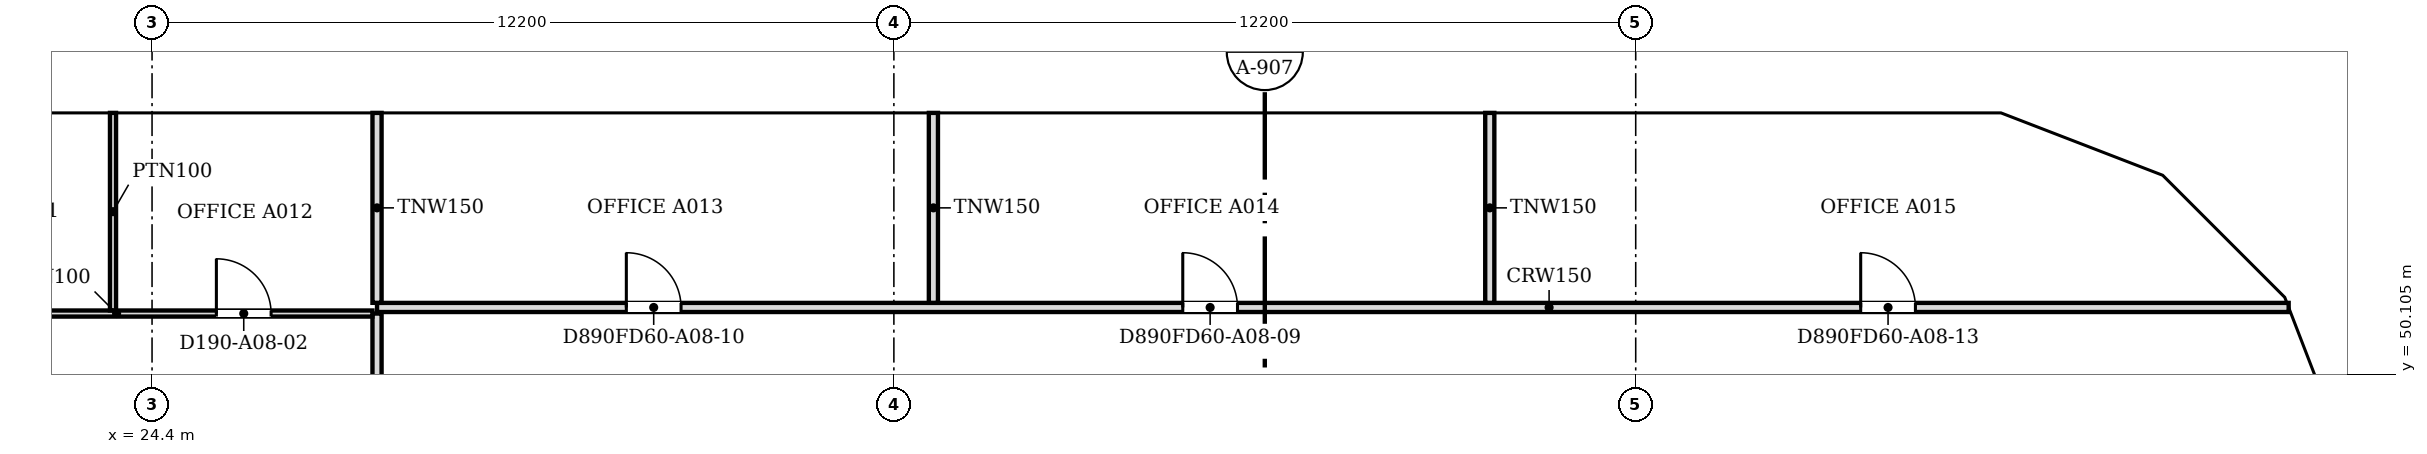
"""IFC4 building model, lengths in metres.
Left out: names, types, materials, properties, quantities, classifications, styles, units other than length and angle.
Written with IfcOpenShell. Run it as: python <this file> out.ifc"""

import sys

from ifc_helpers import new_model, si_unit, direction, frame, frame_2d, origin, place, context, subcontext, project, spatial, polyline, rectangle, outline, extrude, faceted_brep, source, transform, mapped, element, fill, save


model = new_model("IFC4")
c1 = context("Model", 3, precision=1e-05, world=origin(), true_north=direction((0.0, 1.0)))
c2 = subcontext(c1, "Body", "Model", "MODEL_VIEW")
j1 = project(units=[si_unit("LENGTHUNIT", "METRE"), si_unit("PLANEANGLEUNIT", "RADIAN")], contexts=[c1])
p1 = place(None, origin())
s1 = spatial("IfcSite", under=j1, at=p1, CompositionType="ELEMENT")
p2 = place(p1, origin())
s2 = spatial("IfcBuilding", under=s1, at=p2, CompositionType="ELEMENT")
p3 = place(p2, frame((0.0, 0.0, 95.2)))
s3 = spatial("IfcBuildingStorey", under=s2, at=p3, CompositionType="ELEMENT", Elevation=95.2)
m1 = source(origin(), c2, "Body", "Brep", [
    faceted_brep([(0.047, -0.25, 0.0), (2.997, -0.25, 3.8), (0.047, -0.25, 7.6), (0.0, -0.25, 7.541), (0.0, -0.25, 0.059), (0.093, 0.25, 7.54), (2.944, 0.25, 3.868), (2.944, 0.25, 3.732), (0.093, 0.25, 0.06), (2.997, 0.0, 3.8), (0.047, 0.0, 0.0), (0.047, 0.0, 7.6)], [[[0, 1, 2, 3, 4]], [[5, 6, 7, 8]], [[8, 7, 9, 1, 0, 10]], [[6, 5, 11, 2, 1, 9]], [[3, 2, 11]], [[10, 0, 4]], [[8, 10, 4, 3, 11, 5]], [[9, 7, 6]]]),
])
p4 = place(p3, frame((60.767, 48.71, -3.8), z_axis=(0.0, 0.0, 1.0), x_axis=(-0.359901446078, 0.932990326376, 0.0)))
e1 = element("IfcWall", 1, at=p4, inside=s3, PredefinedType="SOLIDWALL", context=c2, shape_type="MappedRepresentation", body=[
    mapped(m1, transform((0.0, 0.0, 0.0), scale=1.0)),
])
m2 = source(origin(), c2, "Body", "SweptSolid", [
    extrude(outline(polyline([(0.247, 0.665), (2.681, 3.8), (0.247, 6.935), (0.247, 0.665)])), frame((0.0, 0.26, 0.0), z_axis=(0.0, -1.0, 0.0), x_axis=(1.0, 0.0, 0.0)), (0.0, 0.0, 1.0), 0.52),
])
p5 = place(p4, origin())
e2 = element("IfcOpeningElement", 2, at=p5, cuts=e1, PredefinedType="OPENING", context=c2, shape_type="MappedRepresentation", body=[
    mapped(m2, transform((0.0, 0.0, 0.0), scale=1.0)),
])
m3 = source(origin(), c2, "Body", "Brep", [
    faceted_brep([(2.944, -0.25, 0.0), (2.997, -0.25, 0.068), (2.997, -0.25, 7.532), (2.944, -0.25, 7.6), (0.0, -0.25, 3.8), (0.053, 0.25, 3.868), (2.891, 0.25, 7.532), (2.891, 0.25, 0.068), (0.053, 0.25, 3.732), (2.944, 0.0, 0.0), (2.944, 0.0, 7.6), (0.0, 0.0, 3.8)], [[[0, 1, 2, 3, 4]], [[5, 6, 7, 8]], [[1, 0, 9]], [[10, 3, 2]], [[6, 5, 11, 4, 3, 10]], [[8, 7, 9, 0, 4, 11]], [[8, 11, 5]], [[1, 9, 7, 6, 10, 2]]]),
])
p6 = place(p3, frame((59.688, 51.506, -3.8), z_axis=(0.0, 0.0, 1.0), x_axis=(-0.707106781187, 0.707106781187, 0.0)))
e3 = element("IfcWall", 3, at=p6, inside=s3, PredefinedType="SOLIDWALL", context=c2, shape_type="MappedRepresentation", body=[
    mapped(m3, transform((0.0, 0.0, 0.0), scale=1.0)),
])
m4 = source(origin(), c2, "Body", "SweptSolid", [
    extrude(outline(polyline([(2.744, 6.934), (0.316, 3.8), (2.744, 0.667), (2.744, 6.934)])), frame((0.0, 0.26, 0.0), z_axis=(0.0, -1.0, 0.0), x_axis=(1.0, 0.0, 0.0)), (0.0, 0.0, 1.0), 0.52),
])
p7 = place(p6, origin())
e4 = element("IfcOpeningElement", 4, at=p7, cuts=e3, PredefinedType="OPENING", context=c2, shape_type="MappedRepresentation", body=[
    mapped(m4, transform((0.0, 0.0, 0.0), scale=1.0)),
])
m5 = source(origin(), c2, "Body", "Brep", [
    faceted_brep([(0.053, -0.25, 0.0), (3.003, -0.25, 3.8), (0.053, -0.25, 7.6), (0.0, -0.25, 7.532), (0.0, -0.25, 0.068), (0.106, 0.25, 7.532), (2.957, 0.25, 3.86), (2.957, 0.25, 3.74), (0.106, 0.25, 0.068), (3.003, 0.0, 3.8), (0.053, 0.0, 0.0), (0.053, 0.0, 7.6)], [[[0, 1, 2, 3, 4]], [[5, 6, 7, 8]], [[8, 7, 9, 1, 0, 10]], [[6, 5, 11, 2, 1, 9]], [[3, 2, 11]], [[10, 0, 4]], [[8, 10, 4, 3, 11, 5]], [[9, 7, 6]]]),
])
p8 = place(p3, frame((57.656, 53.569, -3.8), z_axis=(0.0, 0.0, 1.0), x_axis=(-0.933007896601, 0.359855894603, 0.0)))
e5 = element("IfcWall", 5, at=p8, inside=s3, PredefinedType="SOLIDWALL", context=c2, shape_type="MappedRepresentation", body=[
    mapped(m5, transform((0.0, 0.0, 0.0), scale=1.0)),
])
m6 = source(origin(), c2, "Body", "SweptSolid", [
    extrude(outline(polyline([(0.253, 0.665), (2.687, 3.8), (0.253, 6.935), (0.253, 0.665)])), frame((0.0, 0.26, 0.0), z_axis=(0.0, -1.0, 0.0), x_axis=(1.0, 0.0, 0.0)), (0.0, 0.0, 1.0), 0.52),
])
p9 = place(p8, origin())
e6 = element("IfcOpeningElement", 6, at=p9, cuts=e5, PredefinedType="OPENING", context=c2, shape_type="MappedRepresentation", body=[
    mapped(m6, transform((0.0, 0.0, 0.0), scale=1.0)),
])
m7 = source(origin(), c2, "Body", "Brep", [
    faceted_brep([(3.003, -0.25, 0.0), (6.053, -0.25, 3.8), (3.003, -0.25, 7.6), (0.0, -0.25, 3.8), (0.047, 0.25, 3.859), (3.003, 0.25, 7.6), (6.053, 0.25, 3.8), (3.003, 0.25, 0.0), (0.047, 0.25, 3.741), (0.0, 0.0, 3.8)], [[[0, 1, 2, 3]], [[4, 5, 6, 7, 8]], [[7, 6, 1, 0]], [[6, 5, 2, 1]], [[5, 4, 9, 3, 2]], [[8, 7, 0, 3, 9]], [[8, 9, 4]]]),
])
p10 = place(p3, frame((54.854, 54.65, -3.8), z_axis=(0.0, 0.0, 1.0), x_axis=(-1.0, 0.0, 0.0)))
e7 = element("IfcWall", 7, at=p10, inside=s3, PredefinedType="SOLIDWALL", context=c2, shape_type="MappedRepresentation", body=[
    mapped(m7, transform((0.0, 0.0, 0.0), scale=1.0)),
])
m8 = source(origin(), c2, "Body", "SweptSolid", [
    extrude(outline(polyline([(3.005, 0.401), (5.733, 3.8), (3.005, 7.199), (0.319, 3.8), (3.005, 0.401)])), frame((0.0, 0.26, 0.0), z_axis=(0.0, -1.0, 0.0), x_axis=(1.0, 0.0, 0.0)), (0.0, 0.0, 1.0), 0.52),
])
p11 = place(p10, origin())
e8 = element("IfcOpeningElement", 8, at=p11, cuts=e7, PredefinedType="OPENING", context=c2, shape_type="MappedRepresentation", body=[
    mapped(m8, transform((0.0, 0.0, 0.0), scale=1.0)),
])
m9 = source(origin(), c2, "Body", "SweptSolid", [
    extrude(outline(polyline([(3.05, 0.0), (6.1, 3.8), (3.05, 7.6), (0.0, 3.8), (3.05, 0.0)])), frame((0.0, 0.25, 0.0), z_axis=(0.0, -1.0, 0.0), x_axis=(1.0, 0.0, 0.0)), (0.0, 0.0, 1.0), 0.5),
])
p12 = place(p3, frame((48.8, 54.65, -3.8), z_axis=(0.0, 0.0, 1.0), x_axis=(-1.0, 0.0, 0.0)))
e9 = element("IfcWall", 9, at=p12, inside=s3, PredefinedType="SOLIDWALL", context=c2, shape_type="MappedRepresentation", body=[
    mapped(m9, transform((0.0, 0.0, 0.0), scale=1.0)),
])
m10 = source(origin(), c2, "Body", "SweptSolid", [
    extrude(outline(polyline([(3.05, 0.399), (5.78, 3.8), (3.05, 7.201), (0.321, 3.8), (3.05, 0.399)])), frame((0.0, 0.26, 0.0), z_axis=(0.0, -1.0, 0.0), x_axis=(1.0, 0.0, 0.0)), (0.0, 0.0, 1.0), 0.52),
])
p13 = place(p12, origin())
e10 = element("IfcOpeningElement", 10, at=p13, cuts=e9, PredefinedType="OPENING", context=c2, shape_type="MappedRepresentation", body=[
    mapped(m10, transform((0.0, 0.0, 0.0), scale=1.0)),
])
m11 = source(origin(), c2, "Body", "Brep", [
    faceted_brep([(3.05, -0.25, 0.0), (6.1, -0.25, 3.8), (6.1, -0.25, 3.8), (3.05, -0.25, 7.6), (0.0, -0.25, 3.8), (0.0, 0.25, 3.8), (3.05, 0.25, 7.6), (6.1, 0.25, 3.8), (6.1, 0.25, 3.8), (3.05, 0.25, 0.0)], [[[0, 1, 2, 3, 4]], [[5, 6, 7, 8, 9]], [[9, 8, 1, 0]], [[7, 6, 3, 2]], [[6, 5, 4, 3]], [[5, 9, 0, 4]], [[1, 8, 7, 2]]]),
])
p14 = place(p3, frame((42.7, 54.65, -3.8), z_axis=(0.0, 0.0, 1.0), x_axis=(-1.0, 0.0, 0.0)))
e11 = element("IfcWall", 11, at=p14, inside=s3, PredefinedType="SOLIDWALL", context=c2, shape_type="MappedRepresentation", body=[
    mapped(m11, transform((0.0, 0.0, 0.0), scale=1.0)),
])
p15 = place(p14, origin())
e12 = element("IfcOpeningElement", 12, at=p15, cuts=e11, PredefinedType="OPENING", context=c2, shape_type="MappedRepresentation", body=[
    mapped(m10, transform((0.0, 0.0, 0.0), scale=1.0)),
])
p16 = place(p3, frame((36.6, 54.65, -3.8), z_axis=(0.0, 0.0, 1.0), x_axis=(-1.0, 0.0, 0.0)))
e13 = element("IfcWall", 13, at=p16, inside=s3, PredefinedType="SOLIDWALL", context=c2, shape_type="MappedRepresentation", body=[
    mapped(m9, transform((0.0, 0.0, 0.0), scale=1.0)),
])
p17 = place(p16, origin())
e14 = element("IfcOpeningElement", 14, at=p17, cuts=e13, PredefinedType="OPENING", context=c2, shape_type="MappedRepresentation", body=[
    mapped(m10, transform((0.0, 0.0, 0.0), scale=1.0)),
])
p18 = place(p3, frame((30.5, 54.65, -3.8), z_axis=(0.0, 0.0, 1.0), x_axis=(-1.0, 0.0, 0.0)))
e15 = element("IfcWall", 15, at=p18, inside=s3, PredefinedType="SOLIDWALL", context=c2, shape_type="MappedRepresentation", body=[
    mapped(m9, transform((0.0, 0.0, 0.0), scale=1.0)),
])
p19 = place(p18, origin())
e16 = element("IfcOpeningElement", 16, at=p19, cuts=e15, PredefinedType="OPENING", context=c2, shape_type="MappedRepresentation", body=[
    mapped(m10, transform((0.0, 0.0, 0.0), scale=1.0)),
])
p20 = place(p3, frame((24.4, 54.65, -3.8), z_axis=(0.0, 0.0, 1.0), x_axis=(-1.0, 0.0, 0.0)))
e17 = element("IfcWall", 17, at=p20, inside=s3, PredefinedType="SOLIDWALL", context=c2, shape_type="MappedRepresentation", body=[
    mapped(m11, transform((0.0, 0.0, 0.0), scale=1.0)),
])
p21 = place(p20, origin())
e18 = element("IfcOpeningElement", 18, at=p21, cuts=e17, PredefinedType="OPENING", context=c2, shape_type="MappedRepresentation", body=[
    mapped(m10, transform((0.0, 0.0, 0.0), scale=1.0)),
])
p22 = place(p2, frame((0.0, 0.0, 99.0)))
s4 = spatial("IfcBuildingStorey", under=s2, at=p22, CompositionType="ELEMENT", Elevation=99.0)
m12 = source(origin(), c2, "Body", "Brep", [
    faceted_brep([(2.95, -0.25, 0.0), (3.003, -0.25, 0.068), (3.003, -0.25, 7.532), (2.95, -0.25, 7.6), (0.0, -0.25, 3.8), (0.047, 0.25, 3.86), (2.898, 0.25, 7.532), (2.898, 0.25, 0.068), (0.047, 0.25, 3.74), (2.95, 0.0, 0.0), (2.95, 0.0, 7.6), (0.0, 0.0, 3.8)], [[[0, 1, 2, 3, 4]], [[5, 6, 7, 8]], [[1, 0, 9]], [[10, 3, 2]], [[6, 5, 11, 4, 3, 10]], [[8, 7, 9, 0, 4, 11]], [[8, 11, 5]], [[1, 9, 7, 6, 10, 2]]]),
])
p23 = place(p22, frame((60.75, 48.753, -3.8), z_axis=(0.0, 0.0, 1.0), x_axis=(-0.35992665181, 0.932980602862, 0.0)))
e19 = element("IfcWall", 19, at=p23, inside=s4, PredefinedType="SOLIDWALL", context=c2, shape_type="MappedRepresentation", body=[
    mapped(m12, transform((0.0, 0.0, 0.0), scale=1.0)),
])
m13 = source(origin(), c2, "Body", "SweptSolid", [
    extrude(outline(polyline([(2.75, 6.935), (0.316, 3.8), (2.75, 0.665), (2.75, 6.935)])), frame((0.0, 0.26, 0.0), z_axis=(0.0, -1.0, 0.0), x_axis=(1.0, 0.0, 0.0)), (0.0, 0.0, 1.0), 0.52),
])
p24 = place(p23, origin())
e20 = element("IfcOpeningElement", 20, at=p24, cuts=e19, PredefinedType="OPENING", context=c2, shape_type="MappedRepresentation", body=[
    mapped(m13, transform((0.0, 0.0, 0.0), scale=1.0)),
])
m14 = source(origin(), c2, "Body", "Brep", [
    faceted_brep([(0.053, -0.25, 0.0), (2.997, -0.25, 3.8), (0.053, -0.25, 7.6), (0.0, -0.25, 7.532), (0.0, -0.25, 0.068), (0.106, 0.25, 7.532), (2.944, 0.25, 3.868), (2.944, 0.25, 3.732), (0.106, 0.25, 0.068), (2.997, 0.0, 3.8), (0.053, 0.0, 0.0), (0.053, 0.0, 7.6)], [[[0, 1, 2, 3, 4]], [[5, 6, 7, 8]], [[8, 7, 9, 1, 0, 10]], [[6, 5, 11, 2, 1, 9]], [[3, 2, 11]], [[10, 0, 4]], [[8, 10, 4, 3, 11, 5]], [[9, 7, 6]]]),
])
p25 = place(p22, frame((59.726, 51.469, -3.8), z_axis=(0.0, 0.0, 1.0), x_axis=(-0.707106781187, 0.707106781187, 0.0)))
e21 = element("IfcWall", 21, at=p25, inside=s4, PredefinedType="SOLIDWALL", context=c2, shape_type="MappedRepresentation", body=[
    mapped(m14, transform((0.0, 0.0, 0.0), scale=1.0)),
])
m15 = source(origin(), c2, "Body", "SweptSolid", [
    extrude(outline(polyline([(0.253, 0.666), (2.681, 3.8), (0.253, 6.934), (0.253, 0.666)])), frame((0.0, 0.26, 0.0), z_axis=(0.0, -1.0, 0.0), x_axis=(1.0, 0.0, 0.0)), (0.0, 0.0, 1.0), 0.52),
])
p26 = place(p25, origin())
e22 = element("IfcOpeningElement", 22, at=p26, cuts=e21, PredefinedType="OPENING", context=c2, shape_type="MappedRepresentation", body=[
    mapped(m15, transform((0.0, 0.0, 0.0), scale=1.0)),
])
m16 = source(origin(), c2, "Body", "Brep", [
    faceted_brep([(2.95, -0.25, 0.0), (2.997, -0.25, 0.059), (2.997, -0.25, 7.541), (2.95, -0.25, 7.6), (0.0, -0.25, 3.8), (0.053, 0.25, 3.868), (2.904, 0.25, 7.54), (2.904, 0.25, 0.06), (0.053, 0.25, 3.732), (2.95, 0.0, 0.0), (2.95, 0.0, 7.6), (0.0, 0.0, 3.8)], [[[0, 1, 2, 3, 4]], [[5, 6, 7, 8]], [[1, 0, 9]], [[10, 3, 2]], [[6, 5, 11, 4, 3, 10]], [[8, 7, 9, 0, 4, 11]], [[8, 11, 5]], [[1, 9, 7, 6, 10, 2]]]),
])
p27 = place(p22, frame((57.606, 53.588, -3.8), z_axis=(0.0, 0.0, 1.0), x_axis=(-0.932990326376, 0.359901446078, 0.0)))
e23 = element("IfcWall", 23, at=p27, inside=s4, PredefinedType="SOLIDWALL", context=c2, shape_type="MappedRepresentation", body=[
    mapped(m16, transform((0.0, 0.0, 0.0), scale=1.0)),
])
p28 = place(p27, origin())
e24 = element("IfcOpeningElement", 24, at=p28, cuts=e23, PredefinedType="OPENING", context=c2, shape_type="MappedRepresentation", body=[
    mapped(m13, transform((0.0, 0.0, 0.0), scale=1.0)),
])
m17 = source(origin(), c2, "Body", "Brep", [
    faceted_brep([(0.047, -0.25, 0.0), (3.05, -0.25, 3.8), (0.047, -0.25, 7.6), (0.0, -0.25, 7.54), (0.0, -0.25, 0.06), (0.093, 0.25, 7.541), (3.05, 0.25, 3.8), (0.093, 0.25, 0.059), (0.047, 0.0, 0.0), (0.047, 0.0, 7.6)], [[[0, 1, 2, 3, 4]], [[5, 6, 7]], [[7, 6, 1, 0, 8]], [[6, 5, 9, 2, 1]], [[3, 2, 9]], [[8, 0, 4]], [[7, 8, 4, 3, 9, 5]]]),
])
p29 = place(p22, frame((54.9, 54.65, -3.8), z_axis=(0.0, 0.0, 1.0), x_axis=(-1.0, 0.0, 0.0)))
e25 = element("IfcWall", 25, at=p29, inside=s4, PredefinedType="SOLIDWALL", context=c2, shape_type="MappedRepresentation", body=[
    mapped(m17, transform((0.0, 0.0, 0.0), scale=1.0)),
])
m18 = source(origin(), c2, "Body", "SweptSolid", [
    extrude(outline(polyline([(0.247, 0.656), (2.731, 3.8), (0.247, 6.944), (0.247, 0.656)])), frame((0.0, 0.26, 0.0), z_axis=(0.0, -1.0, 0.0), x_axis=(1.0, 0.0, 0.0)), (0.0, 0.0, 1.0), 0.52),
])
p30 = place(p29, origin())
e26 = element("IfcOpeningElement", 26, at=p30, cuts=e25, PredefinedType="OPENING", context=c2, shape_type="MappedRepresentation", body=[
    mapped(m18, transform((0.0, 0.0, 0.0), scale=1.0)),
])
p31 = place(p22, frame((51.85, 54.65, -3.8), z_axis=(0.0, 0.0, 1.0), x_axis=(-1.0, 0.0, 0.0)))
e27 = element("IfcWall", 27, at=p31, inside=s4, PredefinedType="SOLIDWALL", context=c2, shape_type="MappedRepresentation", body=[
    mapped(m9, transform((0.0, 0.0, 0.0), scale=1.0)),
])
p32 = place(p31, origin())
e28 = element("IfcOpeningElement", 28, at=p32, cuts=e27, PredefinedType="OPENING", context=c2, shape_type="MappedRepresentation", body=[
    mapped(m10, transform((0.0, 0.0, 0.0), scale=1.0)),
])
p33 = place(p22, frame((45.75, 54.65, -3.8), z_axis=(0.0, 0.0, 1.0), x_axis=(-1.0, 0.0, 0.0)))
e29 = element("IfcWall", 29, at=p33, inside=s4, PredefinedType="SOLIDWALL", context=c2, shape_type="MappedRepresentation", body=[
    mapped(m9, transform((0.0, 0.0, 0.0), scale=1.0)),
])
p34 = place(p33, origin())
e30 = element("IfcOpeningElement", 30, at=p34, cuts=e29, PredefinedType="OPENING", context=c2, shape_type="MappedRepresentation", body=[
    mapped(m10, transform((0.0, 0.0, 0.0), scale=1.0)),
])
p35 = place(p22, frame((39.65, 54.65, -3.8), z_axis=(0.0, 0.0, 1.0), x_axis=(-1.0, 0.0, 0.0)))
e31 = element("IfcWall", 31, at=p35, inside=s4, PredefinedType="SOLIDWALL", context=c2, shape_type="MappedRepresentation", body=[
    mapped(m11, transform((0.0, 0.0, 0.0), scale=1.0)),
])
p36 = place(p35, origin())
e32 = element("IfcOpeningElement", 32, at=p36, cuts=e31, PredefinedType="OPENING", context=c2, shape_type="MappedRepresentation", body=[
    mapped(m10, transform((0.0, 0.0, 0.0), scale=1.0)),
])
p37 = place(p22, frame((33.55, 54.65, -3.8), z_axis=(0.0, 0.0, 1.0), x_axis=(-1.0, 0.0, 0.0)))
e33 = element("IfcWall", 33, at=p37, inside=s4, PredefinedType="SOLIDWALL", context=c2, shape_type="MappedRepresentation", body=[
    mapped(m9, transform((0.0, 0.0, 0.0), scale=1.0)),
])
p38 = place(p37, origin())
e34 = element("IfcOpeningElement", 34, at=p38, cuts=e33, PredefinedType="OPENING", context=c2, shape_type="MappedRepresentation", body=[
    mapped(m10, transform((0.0, 0.0, 0.0), scale=1.0)),
])
p39 = place(p22, frame((27.45, 54.65, -3.8), z_axis=(0.0, 0.0, 1.0), x_axis=(-1.0, 0.0, 0.0)))
e35 = element("IfcWall", 35, at=p39, inside=s4, PredefinedType="SOLIDWALL", context=c2, shape_type="MappedRepresentation", body=[
    mapped(m11, transform((0.0, 0.0, 0.0), scale=1.0)),
])
p40 = place(p39, origin())
e36 = element("IfcOpeningElement", 36, at=p40, cuts=e35, PredefinedType="OPENING", context=c2, shape_type="MappedRepresentation", body=[
    mapped(m10, transform((0.0, 0.0, 0.0), scale=1.0)),
])
p41 = place(p3, frame((28.1, 47.776, 0.0), z_axis=(0.0, 0.0, 1.0), x_axis=(0.0, 1.0, 0.0)))
e37 = element("IfcWall", 37, at=p41, inside=s3, PredefinedType="PARTITIONING", context=c2, shape_type="SweptSolid", body=[
    extrude(rectangle(XDim=3.324, YDim=0.15, at=frame_2d((1.662, 0.0))), origin(), (0.0, 0.0, 1.0), 3.067),
])
p42 = place(p3, frame((19.776, 51.1, 0.0), z_axis=(0.0, 0.0, 1.0), x_axis=(1.0, 0.0, 0.0)))
e38 = element("IfcWall", 38, at=p42, inside=s3, PredefinedType="PARTITIONING", context=c2, shape_type="SweptSolid", body=[
    extrude(rectangle(XDim=8.248, YDim=0.1, at=frame_2d((4.124, 0.0))), origin(), (0.0, 0.0, 1.0), 3.067),
])
m19 = source(origin(), c2, "Body", "SweptSolid", [
    extrude(rectangle(XDim=0.9, YDim=2.1, at=frame_2d((0.45, 1.05))), frame((0.0, 0.06, 0.0), z_axis=(0.0, -1.0, 0.0), x_axis=(1.0, 0.0, 0.0)), (0.0, 0.0, 1.0), 0.12),
])
p43 = place(p42, frame((1.5, 0.0, 0.0)))
e39 = element("IfcOpeningElement", 39, at=p43, cuts=e38, PredefinedType="OPENING", context=c2, shape_type="MappedRepresentation", body=[
    mapped(m19, transform((0.0, 0.0, 0.0), scale=1.0)),
])
p44 = place(p42, frame((5.682, 0.0, 0.0)))
e40 = element("IfcOpeningElement", 40, at=p44, cuts=e38, PredefinedType="OPENING", context=c2, shape_type="MappedRepresentation", body=[
    mapped(m19, transform((0.0, 0.0, 0.0), scale=1.0)),
])
p45 = place(p3, frame((23.758, 51.151, 0.0), z_axis=(0.0, 0.0, 1.0), x_axis=(0.0, 1.0, 0.0)))
e41 = element("IfcWall", 41, at=p45, inside=s3, PredefinedType="PARTITIONING", context=c2, shape_type="SweptSolid", body=[
    extrude(rectangle(XDim=3.249, YDim=0.1, at=frame_2d((1.625, 0.0))), origin(), (0.0, 0.0, 1.0), 3.067),
])
p46 = place(p3, frame((28.1, 51.2, 0.0), z_axis=(0.0, 0.0, 1.0), x_axis=(1.0, 0.0, 0.0)))
e42 = element("IfcWall", 42, at=p46, inside=s3, PredefinedType="PARTITIONING", context=c2, shape_type="SweptSolid", body=[
    extrude(rectangle(XDim=31.438, YDim=0.15, at=frame_2d((15.719, 0.0))), origin(), (0.0, 0.0, 1.0), 3.067),
])
m20 = source(origin(), c2, "Body", "SweptSolid", [
    extrude(rectangle(XDim=0.9, YDim=2.1, at=frame_2d((0.45, 1.05))), frame((0.0, 0.085, 0.0), z_axis=(0.0, -1.0, 0.0), x_axis=(1.0, 0.0, 0.0)), (0.0, 0.0, 1.0), 0.17),
])
p47 = place(p46, frame((13.251, 0.0, 0.0)))
e43 = element("IfcOpeningElement", 43, at=p47, cuts=e42, PredefinedType="OPENING", context=c2, shape_type="MappedRepresentation", body=[
    mapped(m20, transform((0.0, 0.0, 0.0), scale=1.0)),
])
p48 = place(p46, frame((4.1, 0.0, 0.0)))
e44 = element("IfcOpeningElement", 44, at=p48, cuts=e42, PredefinedType="OPENING", context=c2, shape_type="MappedRepresentation", body=[
    mapped(m20, transform((0.0, 0.0, 0.0), scale=1.0)),
])
p49 = place(p46, frame((24.4, 0.0, 0.0)))
e45 = element("IfcOpeningElement", 45, at=p49, cuts=e42, PredefinedType="OPENING", context=c2, shape_type="MappedRepresentation", body=[
    mapped(m20, transform((0.0, 0.0, 0.0), scale=1.0)),
])
for number, where, z_axis, x_axis in (
    (46, (28.1, 51.276, 0.0), (0.0, 0.0, 1.0), (0.0, 1.0, 0.0)),
    (47, (37.25, 51.276, 0.0), (0.0, 0.0, 1.0), (0.0, 1.0, 0.0)),
    (48, (46.4, 51.276, 0.0), (0.0, 0.0, 1.0), (0.0, 1.0, 0.0)),
):
    element("IfcWall", number, at=place(p3, frame(where, z_axis=z_axis, x_axis=x_axis)), inside=s3, PredefinedType="PARTITIONING", context=c2, shape_type="SweptSolid", body=[
        extrude(rectangle(XDim=3.124, YDim=0.15, at=frame_2d((1.562, 0.0))), origin(), (0.0, 0.0, 1.0), 3.067),
    ])
m21 = source(origin(), c2, "Body", "SweptSolid", [
    extrude(rectangle(XDim=0.9, YDim=2.1, at=frame_2d((0.45, 1.05))), frame((0.0, 0.025, 0.0), z_axis=(0.0, -1.0, 0.0), x_axis=(1.0, 0.0, 0.0)), (0.0, 0.0, 1.0), 0.05),
])
p50 = place(p44, origin())
e49 = element("IfcDoor", 49, at=p50, inside=s3, OperationType="SINGLE_SWING_LEFT", PredefinedType="DOOR", context=c2, shape_type="MappedRepresentation", body=[
    mapped(m21, transform((0.0, 0.0, 0.0), scale=1.0)),
])
fill(e40, e49)
p51 = place(p47, origin())
e50 = element("IfcDoor", 50, at=p51, inside=s3, OperationType="SINGLE_SWING_LEFT", PredefinedType="DOOR", context=c2, shape_type="MappedRepresentation", body=[
    mapped(m21, transform((0.0, 0.0, 0.0), scale=1.0)),
])
fill(e43, e50)
p52 = place(p48, origin())
e51 = element("IfcDoor", 51, at=p52, inside=s3, OperationType="SINGLE_SWING_LEFT", PredefinedType="DOOR", context=c2, shape_type="MappedRepresentation", body=[
    mapped(m21, transform((0.0, 0.0, 0.0), scale=1.0)),
])
fill(e44, e51)
p53 = place(p49, origin())
e52 = element("IfcDoor", 52, at=p53, inside=s3, OperationType="SINGLE_SWING_LEFT", PredefinedType="DOOR", context=c2, shape_type="MappedRepresentation", body=[
    mapped(m21, transform((0.0, 0.0, 0.0), scale=1.0)),
])
fill(e45, e52)
save(model, sys.argv[1])
